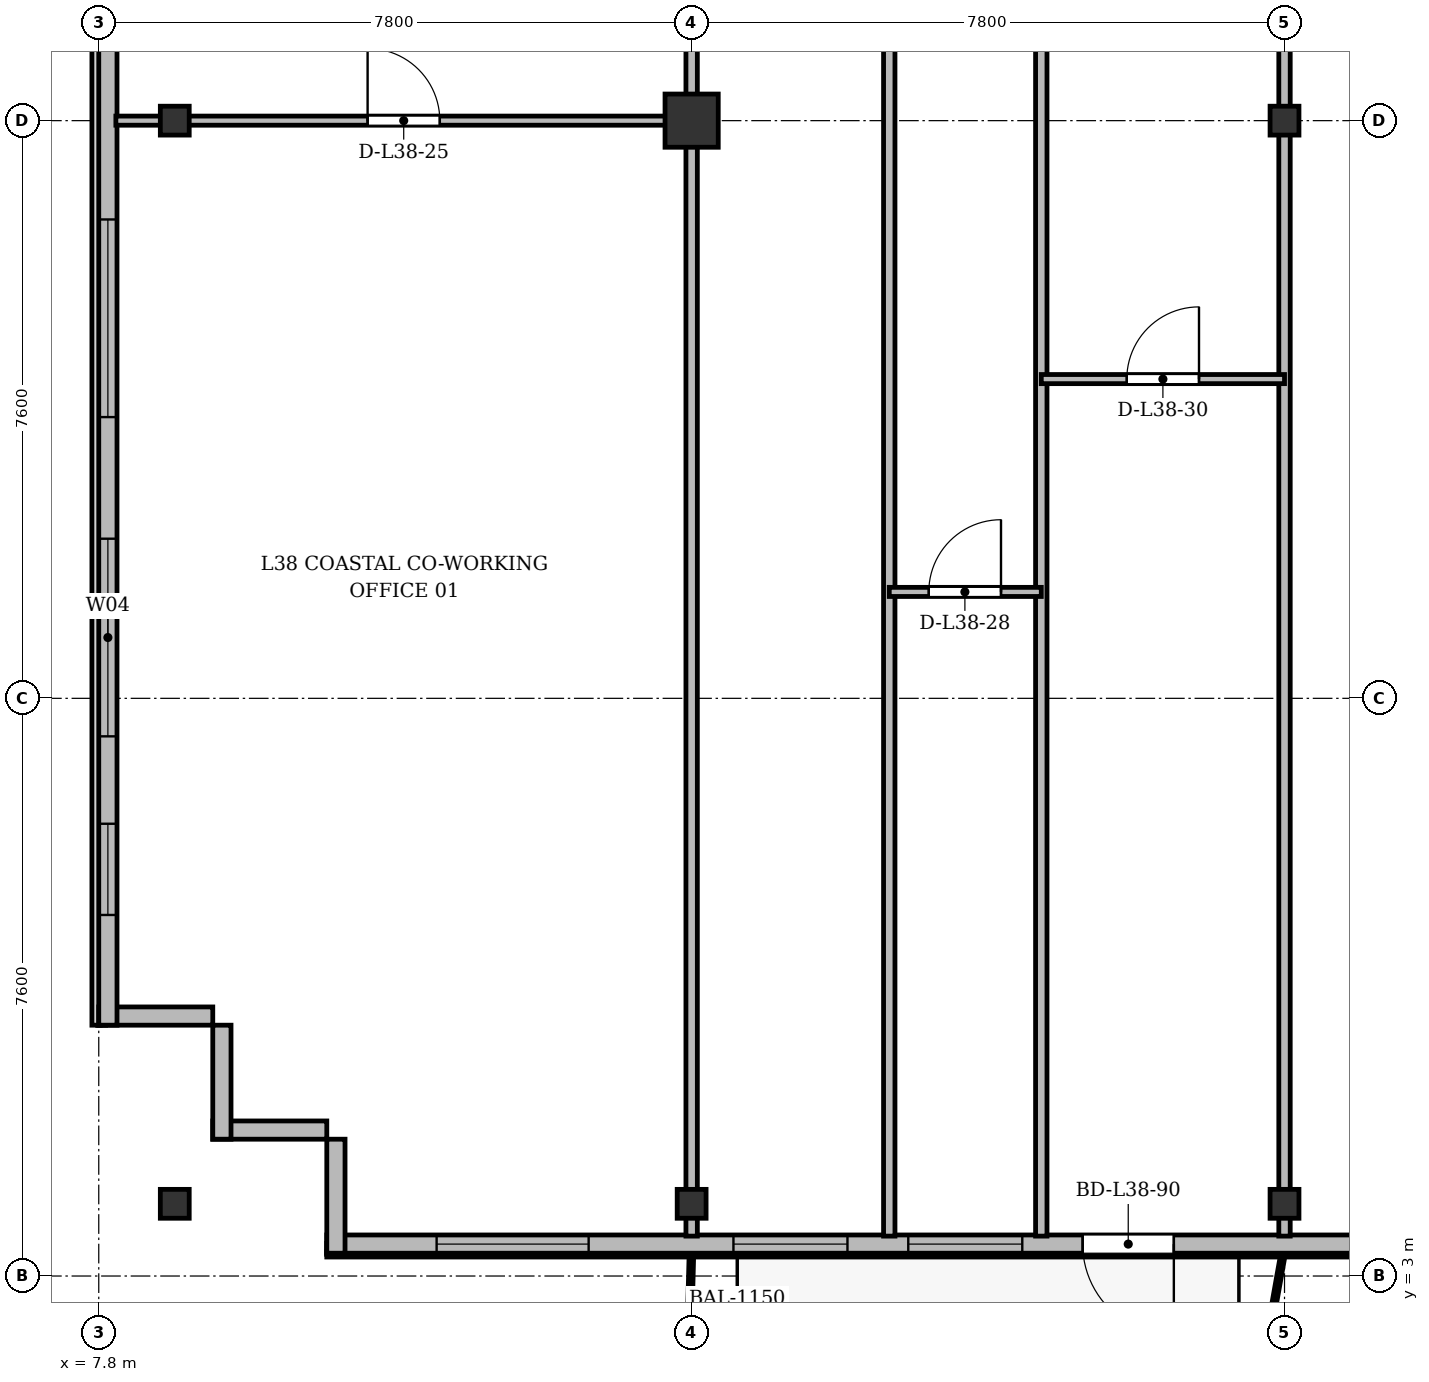
"""IFC4 building model, lengths in metres.
Left out: names, types, materials, properties, quantities, classifications, styles, units other than length and angle.
Written with IfcOpenShell. Run it as: python <this file> out.ifc"""

import sys

from ifc_helpers import new_model, si_unit, direction, frame, frame_2d, origin, origin_2d, place, context, subcontext, project, spatial, rectangle, i_section, extrude, source, transform, mapped, element, fill, save


model = new_model("IFC4")
c1 = context("Model", 3, precision=1e-05, world=origin(), true_north=direction((0.0, 1.0)))
c2 = subcontext(c1, "Body", "Model", "MODEL_VIEW")
j1 = project(units=[si_unit("LENGTHUNIT", "METRE"), si_unit("PLANEANGLEUNIT", "RADIAN")], contexts=[c1])
p1 = place(None, origin())
s1 = spatial("IfcSite", under=j1, at=p1, CompositionType="ELEMENT")
p2 = place(p1, origin())
s2 = spatial("IfcBuilding", under=s1, at=p2, CompositionType="ELEMENT")
p3 = place(p2, frame((0.0, 0.0, 146.5)))
s3 = spatial("IfcBuildingStorey", under=s2, at=p3, CompositionType="ELEMENT", Elevation=146.5)
m1 = source(origin(), c2, "Body", "SweptSolid", [
    extrude(i_section(OverallWidth=0.38, OverallDepth=0.38, WebThickness=0.02, FlangeThickness=0.03, at=origin_2d()), origin(), (0.0, 0.0, 1.0), 3.6),
])
for number, where, z_axis, x_axis in (
    (1, (8.8, 3.95, 0.0), (0.0, 0.0, 1.0), (1.0, 0.0, 0.0)),
    (2, (8.8, 18.2, 0.0), (0.0, 0.0, 1.0), (1.0, 0.0, 0.0)),
    (3, (15.6, 3.95, 0.0), (0.0, 0.0, 1.0), (1.0, 0.0, 0.0)),
):
    element("IfcColumn", number, at=place(p3, frame(where, z_axis=z_axis, x_axis=x_axis)), inside=s3, PredefinedType="COLUMN", context=c2, shape_type="MappedRepresentation", body=[
        mapped(m1, transform((0.0, 0.0, 0.0), x_axis=(1.0, 0.0, 0.0), y_axis=(0.0, 1.0, 0.0), z_axis=(0.0, 0.0, 1.0), scale=1.0)),
    ])
m2 = source(origin(), c2, "Body", "SweptSolid", [
    extrude(rectangle(XDim=0.7, YDim=0.7, at=origin_2d()), origin(), (0.0, 0.0, 1.0), 3.6),
])
p4 = place(p3, frame((15.6, 18.2, 0.0), z_axis=(0.0, 0.0, 1.0), x_axis=(1.0, 0.0, 0.0)))
e4 = element("IfcColumn", 4, at=p4, inside=s3, PredefinedType="COLUMN", context=c2, shape_type="MappedRepresentation", body=[
    mapped(m2, transform((0.0, 0.0, 0.0), x_axis=(1.0, 0.0, 0.0), y_axis=(0.0, 1.0, 0.0), z_axis=(0.0, 0.0, 1.0), scale=1.0)),
])
for number, where, z_axis, x_axis in (
    (5, (23.4, 3.95, 0.0), (0.0, 0.0, 1.0), (1.0, 0.0, 0.0)),
    (6, (23.4, 18.2, 0.0), (0.0, 0.0, 1.0), (1.0, 0.0, 0.0)),
):
    element("IfcColumn", number, at=place(p3, frame(where, z_axis=z_axis, x_axis=x_axis)), inside=s3, PredefinedType="COLUMN", context=c2, shape_type="MappedRepresentation", body=[
        mapped(m1, transform((0.0, 0.0, 0.0), x_axis=(1.0, 0.0, 0.0), y_axis=(0.0, 1.0, 0.0), z_axis=(0.0, 0.0, 1.0), scale=1.0)),
    ])
for number, where, z_axis, x_axis in (
    (7, (10.8, 4.92, 0.0), (0.0, 0.0, 1.0), (-1.0, 0.0, 0.0)),
    (8, (9.42, 4.8, 0.0), (0.0, 0.0, 1.0), (0.0, 1.0, 0.0)),
):
    element("IfcWall", number, at=place(p3, frame(where, z_axis=z_axis, x_axis=x_axis)), inside=s3, PredefinedType="SOLIDWALL", context=c2, shape_type="SweptSolid", body=[
        extrude(rectangle(XDim=1.5, YDim=0.24, at=frame_2d((0.75, 0.0))), origin(), (0.0, 0.0, 1.0), 3.35),
    ])
p5 = place(p3, frame((9.3, 6.42, 0.0), z_axis=(0.0, 0.0, 1.0), x_axis=(-1.0, 0.0, 0.0)))
e9 = element("IfcWall", 9, at=p5, inside=s3, PredefinedType="SOLIDWALL", context=c2, shape_type="SweptSolid", body=[
    extrude(rectangle(XDim=1.5, YDim=0.24, at=frame_2d((0.75, 0.0))), origin(), (0.0, 0.0, 1.0), 2.85),
])
p6 = place(p3, frame((7.92, 6.3, 0.0), z_axis=(0.0, 0.0, 1.0), x_axis=(0.0, 1.0, 0.0)))
e10 = element("IfcWall", 10, at=p6, inside=s3, PredefinedType="SOLIDWALL", context=c2, shape_type="SweptSolid", body=[
    extrude(rectangle(XDim=39.2, YDim=0.24, at=frame_2d((19.6, 0.0))), origin(), (0.0, 0.0, 1.0), 3.35),
])
p7 = place(p6, frame((1.45, 0.0, 0.92)))
e11 = element("IfcOpeningElement", 11, at=p7, cuts=e10, PredefinedType="OPENING", context=c2, shape_type="SweptSolid", body=[
    extrude(rectangle(XDim=1.2, YDim=1.65, at=frame_2d((0.6, 0.825))), frame((0.0, 0.13, 0.0), z_axis=(0.0, -1.0, 0.0), x_axis=(1.0, 0.0, 0.0)), (0.0, 0.0, 1.0), 0.26),
])
p8 = place(p6, frame((3.8, 0.0, 0.92)))
e12 = element("IfcOpeningElement", 12, at=p8, cuts=e10, PredefinedType="OPENING", context=c2, shape_type="SweptSolid", body=[
    extrude(rectangle(XDim=2.6, YDim=1.9, at=frame_2d((1.3, 0.95))), frame((0.0, 0.13, 0.0), z_axis=(0.0, -1.0, 0.0), x_axis=(1.0, 0.0, 0.0)), (0.0, 0.0, 1.0), 0.26),
])
p9 = place(p6, frame((8.0, 0.0, 0.92)))
e13 = element("IfcOpeningElement", 13, at=p9, cuts=e10, PredefinedType="OPENING", context=c2, shape_type="SweptSolid", body=[
    extrude(rectangle(XDim=2.6, YDim=1.9, at=frame_2d((1.3, 0.95))), frame((0.0, 0.13, 0.0), z_axis=(0.0, -1.0, 0.0), x_axis=(1.0, 0.0, 0.0)), (0.0, 0.0, 1.0), 0.26),
])
p10 = place(p6, frame((15.2, 0.0, 0.92)))
e14 = element("IfcOpeningElement", 14, at=p10, cuts=e10, PredefinedType="OPENING", context=c2, shape_type="SweptSolid", body=[
    extrude(rectangle(XDim=2.6, YDim=1.9, at=frame_2d((1.3, 0.95))), frame((0.0, 0.13, 0.0), z_axis=(0.0, -1.0, 0.0), x_axis=(1.0, 0.0, 0.0)), (0.0, 0.0, 1.0), 0.26),
])
p11 = place(p6, frame((29.2, 0.0, 0.92)))
e15 = element("IfcOpeningElement", 15, at=p11, cuts=e10, PredefinedType="OPENING", context=c2, shape_type="SweptSolid", body=[
    extrude(rectangle(XDim=2.6, YDim=1.9, at=frame_2d((1.3, 0.95))), frame((0.0, 0.13, 0.0), z_axis=(0.0, -1.0, 0.0), x_axis=(1.0, 0.0, 0.0)), (0.0, 0.0, 1.0), 0.26),
])
p12 = place(p6, frame((33.5, 0.0, 0.92)))
e16 = element("IfcOpeningElement", 16, at=p12, cuts=e10, PredefinedType="OPENING", context=c2, shape_type="SweptSolid", body=[
    extrude(rectangle(XDim=1.2, YDim=1.65, at=frame_2d((0.6, 0.825))), frame((0.0, 0.13, 0.0), z_axis=(0.0, -1.0, 0.0), x_axis=(1.0, 0.0, 0.0)), (0.0, 0.0, 1.0), 0.26),
])
p13 = place(p6, frame((36.85, 0.0, 0.92)))
e17 = element("IfcOpeningElement", 17, at=p13, cuts=e10, PredefinedType="OPENING", context=c2, shape_type="SweptSolid", body=[
    extrude(rectangle(XDim=1.2, YDim=1.65, at=frame_2d((0.6, 0.825))), frame((0.0, 0.13, 0.0), z_axis=(0.0, -1.0, 0.0), x_axis=(1.0, 0.0, 0.0)), (0.0, 0.0, 1.0), 0.26),
])
p14 = place(p3, frame((63.6, 3.42, 0.0), z_axis=(0.0, 0.0, 1.0), x_axis=(-1.0, 0.0, 0.0)))
e18 = element("IfcWall", 18, at=p14, inside=s3, PredefinedType="SOLIDWALL", context=c2, shape_type="SweptSolid", body=[
    extrude(rectangle(XDim=52.8, YDim=0.24, at=frame_2d((26.4, 0.0))), origin(), (0.0, 0.0, 1.0), 3.35),
])
p15 = place(p14, frame((1.445, 0.0, 0.9)))
e19 = element("IfcOpeningElement", 19, at=p15, cuts=e18, PredefinedType="OPENING", context=c2, shape_type="SweptSolid", body=[
    extrude(rectangle(XDim=2.0, YDim=1.95, at=frame_2d((1.0, 0.975))), frame((0.0, 0.13, 0.0), z_axis=(0.0, -1.0, 0.0), x_axis=(1.0, 0.0, 0.0)), (0.0, 0.0, 1.0), 0.26),
])
p16 = place(p14, frame((5.275, 0.0, 0.9)))
e20 = element("IfcOpeningElement", 20, at=p16, cuts=e18, PredefinedType="OPENING", context=c2, shape_type="SweptSolid", body=[
    extrude(rectangle(XDim=1.65, YDim=1.85, at=frame_2d((0.825, 0.925))), frame((0.0, 0.13, 0.0), z_axis=(0.0, -1.0, 0.0), x_axis=(1.0, 0.0, 0.0)), (0.0, 0.0, 1.0), 0.26),
])
p17 = place(p14, frame((7.65, 0.0, 0.9)))
e21 = element("IfcOpeningElement", 21, at=p17, cuts=e18, PredefinedType="OPENING", context=c2, shape_type="SweptSolid", body=[
    extrude(rectangle(XDim=1.5, YDim=1.75, at=frame_2d((0.75, 0.875))), frame((0.0, 0.13, 0.0), z_axis=(0.0, -1.0, 0.0), x_axis=(1.0, 0.0, 0.0)), (0.0, 0.0, 1.0), 0.26),
])
p18 = place(p14, frame((9.9, 0.0, 0.9)))
e22 = element("IfcOpeningElement", 22, at=p18, cuts=e18, PredefinedType="OPENING", context=c2, shape_type="SweptSolid", body=[
    extrude(rectangle(XDim=2.2, YDim=1.8, at=frame_2d((1.1, 0.9))), frame((0.0, 0.13, 0.0), z_axis=(0.0, -1.0, 0.0), x_axis=(1.0, 0.0, 0.0)), (0.0, 0.0, 1.0), 0.26),
])
p19 = place(p14, frame((14.417, 0.0, 0.0)))
e23 = element("IfcOpeningElement", 23, at=p19, cuts=e18, PredefinedType="OPENING", context=c2, shape_type="SweptSolid", body=[
    extrude(rectangle(XDim=1.2, YDim=2.2, at=frame_2d((0.6, 1.1))), frame((0.0, 0.13, 0.0), z_axis=(0.0, -1.0, 0.0), x_axis=(1.0, 0.0, 0.0)), (0.0, 0.0, 1.0), 0.26),
])
p20 = place(p14, frame((25.4, 0.0, 0.9)))
e24 = element("IfcOpeningElement", 24, at=p20, cuts=e18, PredefinedType="OPENING", context=c2, shape_type="SweptSolid", body=[
    extrude(rectangle(XDim=2.0, YDim=1.95, at=frame_2d((1.0, 0.975))), frame((0.0, 0.13, 0.0), z_axis=(0.0, -1.0, 0.0), x_axis=(1.0, 0.0, 0.0)), (0.0, 0.0, 1.0), 0.26),
])
p21 = place(p14, frame((35.775, 0.0, 0.9)))
e25 = element("IfcOpeningElement", 25, at=p21, cuts=e18, PredefinedType="OPENING", context=c2, shape_type="SweptSolid", body=[
    extrude(rectangle(XDim=1.65, YDim=1.85, at=frame_2d((0.825, 0.925))), frame((0.0, 0.13, 0.0), z_axis=(0.0, -1.0, 0.0), x_axis=(1.0, 0.0, 0.0)), (0.0, 0.0, 1.0), 0.26),
])
p22 = place(p14, frame((41.656, 0.0, 0.0)))
e26 = element("IfcOpeningElement", 26, at=p22, cuts=e18, PredefinedType="OPENING", context=c2, shape_type="SweptSolid", body=[
    extrude(rectangle(XDim=1.2, YDim=2.2, at=frame_2d((0.6, 1.1))), frame((0.0, 0.13, 0.0), z_axis=(0.0, -1.0, 0.0), x_axis=(1.0, 0.0, 0.0)), (0.0, 0.0, 1.0), 0.26),
])
p23 = place(p14, frame((43.65, 0.0, 0.9)))
e27 = element("IfcOpeningElement", 27, at=p23, cuts=e18, PredefinedType="OPENING", context=c2, shape_type="SweptSolid", body=[
    extrude(rectangle(XDim=1.5, YDim=1.75, at=frame_2d((0.75, 0.875))), frame((0.0, 0.13, 0.0), z_axis=(0.0, -1.0, 0.0), x_axis=(1.0, 0.0, 0.0)), (0.0, 0.0, 1.0), 0.26),
])
p24 = place(p14, frame((45.95, 0.0, 0.9)))
e28 = element("IfcOpeningElement", 28, at=p24, cuts=e18, PredefinedType="OPENING", context=c2, shape_type="SweptSolid", body=[
    extrude(rectangle(XDim=1.5, YDim=1.75, at=frame_2d((0.75, 0.875))), frame((0.0, 0.13, 0.0), z_axis=(0.0, -1.0, 0.0), x_axis=(1.0, 0.0, 0.0)), (0.0, 0.0, 1.0), 0.26),
])
p25 = place(p14, frame((49.355, 0.0, 0.9)))
e29 = element("IfcOpeningElement", 29, at=p25, cuts=e18, PredefinedType="OPENING", context=c2, shape_type="SweptSolid", body=[
    extrude(rectangle(XDim=2.0, YDim=1.95, at=frame_2d((1.0, 0.975))), frame((0.0, 0.13, 0.0), z_axis=(0.0, -1.0, 0.0), x_axis=(1.0, 0.0, 0.0)), (0.0, 0.0, 1.0), 0.26),
])
p26 = place(p3, frame((10.92, 3.3, 0.0), z_axis=(0.0, 0.0, 1.0), x_axis=(0.0, 1.0, 0.0)))
e30 = element("IfcWall", 30, at=p26, inside=s3, PredefinedType="SOLIDWALL", context=c2, shape_type="SweptSolid", body=[
    extrude(rectangle(XDim=1.5, YDim=0.24, at=frame_2d((0.75, 0.0))), origin(), (0.0, 0.0, 1.0), 2.75),
])
for number, where, z_axis, x_axis in (
    (31, (15.6, 3.525, 0.0), (0.0, 0.0, 1.0), (0.0, 1.0, 0.0)),
    (32, (23.4, 3.525, 0.0), (0.0, 0.0, 1.0), (0.0, 1.0, 0.0)),
):
    element("IfcWall", number, at=place(p3, frame(where, z_axis=z_axis, x_axis=x_axis)), inside=s3, PredefinedType="PARTITIONING", context=c2, shape_type="SweptSolid", body=[
        extrude(rectangle(XDim=27.275, YDim=0.15, at=frame_2d((13.638, 0.0))), origin(), (0.0, 0.0, 1.0), 2.85),
    ])
p27 = place(p3, frame((8.025, 18.2, 0.0), z_axis=(0.0, 0.0, 1.0), x_axis=(1.0, 0.0, 0.0)))
e33 = element("IfcWall", 33, at=p27, inside=s3, PredefinedType="PARTITIONING", context=c2, shape_type="SweptSolid", body=[
    extrude(rectangle(XDim=7.575, YDim=0.12, at=frame_2d((3.788, 0.0))), origin(), (0.0, 0.0, 1.0), 2.75),
])
p28 = place(p27, frame((3.312, 0.0, 0.0)))
e34 = element("IfcOpeningElement", 34, at=p28, cuts=e33, PredefinedType="OPENING", context=c2, shape_type="SweptSolid", body=[
    extrude(rectangle(XDim=0.95, YDim=2.15, at=frame_2d((0.475, 1.075))), frame((0.0, 0.07, 0.0), z_axis=(0.0, -1.0, 0.0), x_axis=(1.0, 0.0, 0.0)), (0.0, 0.0, 1.0), 0.14),
])
for number, where, z_axis, x_axis in (
    (35, (18.2, 3.525, 0.0), (0.0, 0.0, 1.0), (0.0, 1.0, 0.0)),
    (36, (20.2, 3.525, 0.0), (0.0, 0.0, 1.0), (0.0, 1.0, 0.0)),
):
    element("IfcWall", number, at=place(p3, frame(where, z_axis=z_axis, x_axis=x_axis)), inside=s3, PredefinedType="PARTITIONING", context=c2, shape_type="SweptSolid", body=[
        extrude(rectangle(XDim=27.275, YDim=0.15, at=frame_2d((13.638, 0.0))), origin(), (0.0, 0.0, 1.0), 2.75),
    ])
p29 = place(p3, frame((18.2, 12.0, 0.0), z_axis=(0.0, 0.0, 1.0), x_axis=(1.0, 0.0, 0.0)))
e37 = element("IfcWall", 37, at=p29, inside=s3, PredefinedType="PARTITIONING", context=c2, shape_type="SweptSolid", body=[
    extrude(rectangle(XDim=2.0, YDim=0.12, at=frame_2d((1.0, 0.0))), origin(), (0.0, 0.0, 1.0), 3.35),
])
p30 = place(p29, frame((0.52, 0.0, 0.0)))
e38 = element("IfcOpeningElement", 38, at=p30, cuts=e37, PredefinedType="OPENING", context=c2, shape_type="SweptSolid", body=[
    extrude(rectangle(XDim=0.95, YDim=2.15, at=frame_2d((0.475, 1.075))), frame((0.0, 0.07, 0.0), z_axis=(0.0, -1.0, 0.0), x_axis=(1.0, 0.0, 0.0)), (0.0, 0.0, 1.0), 0.14),
])
p31 = place(p3, frame((20.2, 14.8, 0.0), z_axis=(0.0, 0.0, 1.0), x_axis=(1.0, 0.0, 0.0)))
e39 = element("IfcWall", 39, at=p31, inside=s3, PredefinedType="PARTITIONING", context=c2, shape_type="SweptSolid", body=[
    extrude(rectangle(XDim=3.2, YDim=0.12, at=frame_2d((1.6, 0.0))), origin(), (0.0, 0.0, 1.0), 2.85),
])
p32 = place(p31, frame((1.125, 0.0, 0.0)))
e40 = element("IfcOpeningElement", 40, at=p32, cuts=e39, PredefinedType="OPENING", context=c2, shape_type="SweptSolid", body=[
    extrude(rectangle(XDim=0.95, YDim=2.15, at=frame_2d((0.475, 1.075))), frame((0.0, 0.07, 0.0), z_axis=(0.0, -1.0, 0.0), x_axis=(1.0, 0.0, 0.0)), (0.0, 0.0, 1.0), 0.14),
])
m3 = source(origin(), c2, "Body", "SweptSolid", [
    extrude(rectangle(XDim=1.2, YDim=1.65, at=frame_2d((0.6, 0.825))), frame((0.0, 0.03, 0.0), z_axis=(0.0, -1.0, 0.0), x_axis=(1.0, 0.0, 0.0)), (0.0, 0.0, 1.0), 0.06),
])
p33 = place(p7, origin())
e41 = element("IfcWindow", 41, at=p33, inside=s3, PartitioningType="SINGLE_PANEL", PredefinedType="WINDOW", context=c2, shape_type="MappedRepresentation", body=[
    mapped(m3, transform((0.0, 0.0, 0.0), x_axis=(1.0, 0.0, 0.0), y_axis=(0.0, 1.0, 0.0), z_axis=(0.0, 0.0, 1.0), scale=1.0)),
])
fill(e11, e41)
m4 = source(origin(), c2, "Body", "SweptSolid", [
    extrude(rectangle(XDim=2.6, YDim=1.9, at=frame_2d((1.3, 0.95))), frame((0.0, 0.03, 0.0), z_axis=(0.0, -1.0, 0.0), x_axis=(1.0, 0.0, 0.0)), (0.0, 0.0, 1.0), 0.06),
])
p34 = place(p8, origin())
e42 = element("IfcWindow", 42, at=p34, inside=s3, PartitioningType="SINGLE_PANEL", PredefinedType="WINDOW", context=c2, shape_type="MappedRepresentation", body=[
    mapped(m4, transform((0.0, 0.0, 0.0), x_axis=(1.0, 0.0, 0.0), y_axis=(0.0, 1.0, 0.0), z_axis=(0.0, 0.0, 1.0), scale=1.0)),
])
fill(e12, e42)
p35 = place(p9, origin())
e43 = element("IfcWindow", 43, at=p35, inside=s3, PartitioningType="SINGLE_PANEL", PredefinedType="WINDOW", context=c2, shape_type="MappedRepresentation", body=[
    mapped(m4, transform((0.0, 0.0, 0.0), x_axis=(1.0, 0.0, 0.0), y_axis=(0.0, 1.0, 0.0), z_axis=(0.0, 0.0, 1.0), scale=1.0)),
])
fill(e13, e43)
m5 = source(origin(), c2, "Body", "SweptSolid", [
    extrude(rectangle(XDim=1.2, YDim=2.2, at=frame_2d((0.6, 1.1))), frame((0.0, 0.025, 0.0), z_axis=(0.0, -1.0, 0.0), x_axis=(1.0, 0.0, 0.0)), (0.0, 0.0, 1.0), 0.05),
])
p36 = place(p22, origin())
e44 = element("IfcDoor", 44, at=p36, inside=s3, OperationType="SINGLE_SWING_LEFT", PredefinedType="DOOR", context=c2, shape_type="MappedRepresentation", body=[
    mapped(m5, transform((0.0, 0.0, 0.0), x_axis=(1.0, 0.0, 0.0), y_axis=(0.0, 1.0, 0.0), z_axis=(0.0, 0.0, 1.0), scale=1.0)),
])
fill(e26, e44)
m6 = source(origin(), c2, "Body", "SweptSolid", [
    extrude(rectangle(XDim=1.5, YDim=1.75, at=frame_2d((0.75, 0.875))), frame((0.0, 0.03, 0.0), z_axis=(0.0, -1.0, 0.0), x_axis=(1.0, 0.0, 0.0)), (0.0, 0.0, 1.0), 0.06),
])
p37 = place(p23, origin())
e45 = element("IfcWindow", 45, at=p37, inside=s3, PartitioningType="SINGLE_PANEL", PredefinedType="WINDOW", context=c2, shape_type="MappedRepresentation", body=[
    mapped(m6, transform((0.0, 0.0, 0.0), x_axis=(1.0, 0.0, 0.0), y_axis=(0.0, 1.0, 0.0), z_axis=(0.0, 0.0, 1.0), scale=1.0)),
])
fill(e27, e45)
p38 = place(p24, origin())
e46 = element("IfcWindow", 46, at=p38, inside=s3, PartitioningType="SINGLE_PANEL", PredefinedType="WINDOW", context=c2, shape_type="MappedRepresentation", body=[
    mapped(m6, transform((0.0, 0.0, 0.0), x_axis=(1.0, 0.0, 0.0), y_axis=(0.0, 1.0, 0.0), z_axis=(0.0, 0.0, 1.0), scale=1.0)),
])
fill(e28, e46)
m7 = source(origin(), c2, "Body", "SweptSolid", [
    extrude(rectangle(XDim=2.0, YDim=1.95, at=frame_2d((1.0, 0.975))), frame((0.0, 0.03, 0.0), z_axis=(0.0, -1.0, 0.0), x_axis=(1.0, 0.0, 0.0)), (0.0, 0.0, 1.0), 0.06),
])
p39 = place(p25, origin())
e47 = element("IfcWindow", 47, at=p39, inside=s3, PartitioningType="SINGLE_PANEL", PredefinedType="WINDOW", context=c2, shape_type="MappedRepresentation", body=[
    mapped(m7, transform((0.0, 0.0, 0.0), x_axis=(1.0, 0.0, 0.0), y_axis=(0.0, 1.0, 0.0), z_axis=(0.0, 0.0, 1.0), scale=1.0)),
])
fill(e29, e47)
m8 = source(origin(), c2, "Body", "SweptSolid", [
    extrude(rectangle(XDim=0.95, YDim=2.15, at=frame_2d((0.475, 1.075))), frame((0.0, 0.025, 0.0), z_axis=(0.0, -1.0, 0.0), x_axis=(1.0, 0.0, 0.0)), (0.0, 0.0, 1.0), 0.05),
])
p40 = place(p28, origin())
e48 = element("IfcDoor", 48, at=p40, inside=s3, OperationType="SINGLE_SWING_LEFT", PredefinedType="DOOR", context=c2, shape_type="MappedRepresentation", body=[
    mapped(m8, transform((0.0, 0.0, 0.0), x_axis=(1.0, 0.0, 0.0), y_axis=(0.0, 1.0, 0.0), z_axis=(0.0, 0.0, 1.0), scale=1.0)),
])
fill(e34, e48)
p41 = place(p30, origin())
e49 = element("IfcDoor", 49, at=p41, inside=s3, OperationType="SINGLE_SWING_RIGHT", PredefinedType="DOOR", context=c2, shape_type="MappedRepresentation", body=[
    mapped(m8, transform((0.0, 0.0, 0.0), x_axis=(1.0, 0.0, 0.0), y_axis=(0.0, 1.0, 0.0), z_axis=(0.0, 0.0, 1.0), scale=1.0)),
])
fill(e38, e49)
p42 = place(p32, origin())
e50 = element("IfcDoor", 50, at=p42, inside=s3, OperationType="SINGLE_SWING_RIGHT", PredefinedType="DOOR", context=c2, shape_type="MappedRepresentation", body=[
    mapped(m8, transform((0.0, 0.0, 0.0), x_axis=(1.0, 0.0, 0.0), y_axis=(0.0, 1.0, 0.0), z_axis=(0.0, 0.0, 1.0), scale=1.0)),
])
fill(e40, e50)
save(model, sys.argv[1])
